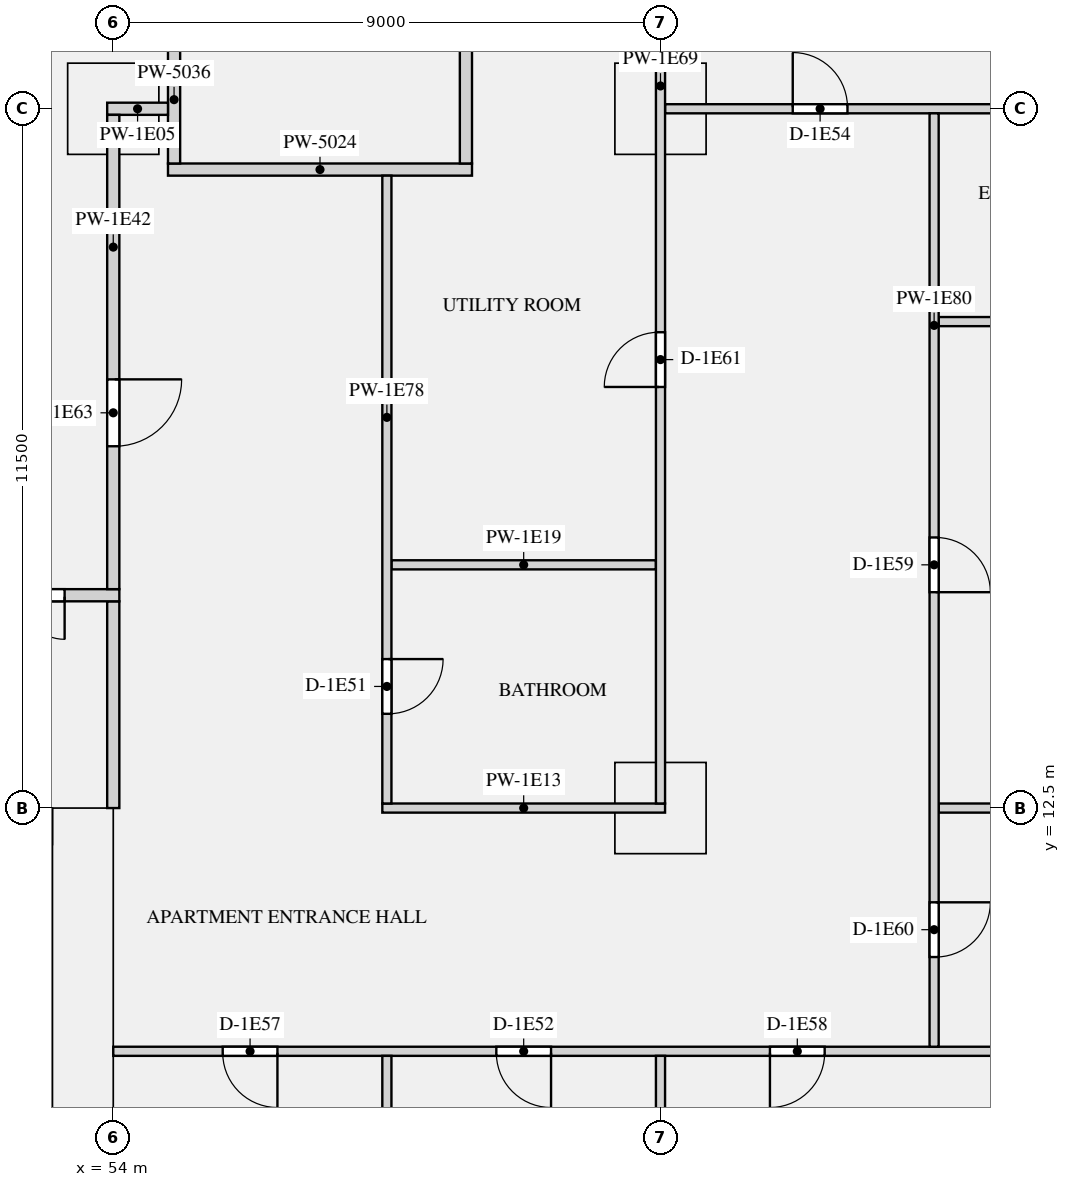
"""IFC4 building model, lengths in metres.
Left out: names, types, materials, properties, quantities, classifications, styles, units other than length and angle.
Written with IfcOpenShell. Run it as: python <this file> out.ifc"""

import sys

from ifc_helpers import new_model, si_unit, direction, frame, frame_2d, origin, origin_2d, place, context, subcontext, project, spatial, rectangle, extrude, element, fill, save


model = new_model("IFC4")
c1 = context("Model", 3, precision=1e-05, world=origin(), true_north=direction((0.0, 1.0)))
c2 = subcontext(c1, "Body", "Model", "MODEL_VIEW")
j1 = project(units=[si_unit("LENGTHUNIT", "METRE"), si_unit("PLANEANGLEUNIT", "RADIAN")], contexts=[c1])
p1 = place(None, origin())
s1 = spatial("IfcSite", under=j1, at=p1, CompositionType="ELEMENT")
p2 = place(p1, origin())
s2 = spatial("IfcBuilding", under=s1, at=p2, CompositionType="ELEMENT")
p3 = place(p2, frame((0.0, 0.0, 54.15)))
s3 = spatial("IfcBuildingStorey", under=s2, at=p3, CompositionType="ELEMENT", Elevation=54.15)
for number, where, z_axis, x_axis in (
    (1, (54.0, 24.0, 0.0), (0.0, 0.0, 1.0), (1.0, 0.0, 0.0)),
    (2, (63.0, 24.0, 0.0), (0.0, 0.0, 1.0), (1.0, 0.0, 0.0)),
    (3, (63.0, 12.5, 0.0), (0.0, 0.0, 1.0), (1.0, 0.0, 0.0)),
):
    element("IfcColumn", number, at=place(p3, frame(where, z_axis=z_axis, x_axis=x_axis)), inside=s3, PredefinedType="COLUMN", context=c2, shape_type="SweptSolid", body=[
        extrude(rectangle(XDim=1.5, YDim=1.5, at=origin_2d()), origin(), (0.0, 0.0, 1.0), 3.15),
    ])
p4 = place(p3, frame((53.5, 0.0, 0.0), z_axis=(0.0, 0.0, 1.0), x_axis=(0.0, 1.0, 0.0)))
e4 = element("IfcWall", 4, at=p4, inside=s3, PredefinedType="SHEAR", context=c2, shape_type="SweptSolid", body=[
    extrude(rectangle(XDim=12.5, YDim=1.0, at=frame_2d((6.25, 0.0))), origin(), (0.0, 0.0, 1.0), 3.15),
])
p5 = place(p3, frame((54.9, 23.0, 0.0), z_axis=(0.0, 0.0, 1.0), x_axis=(1.0, 0.0, 0.0)))
e5 = element("IfcWall", 5, at=p5, inside=s3, PredefinedType="PARTITIONING", context=c2, shape_type="SweptSolid", body=[
    extrude(rectangle(XDim=5.0, YDim=0.2, at=frame_2d((2.5, 0.0))), origin(), (0.0, 0.0, 1.0), 2.83),
])
p6 = place(p3, frame((54.0, 12.5, 0.0), z_axis=(0.0, 0.0, 1.0), x_axis=(0.0, 1.0, 0.0)))
e6 = element("IfcWall", 6, at=p6, inside=s3, PredefinedType="PARTITIONING", context=c2, shape_type="SweptSolid", body=[
    extrude(rectangle(XDim=3.4, YDim=0.2, at=frame_2d((1.7, 0.0))), origin(), (0.0, 0.0, 1.0), 2.83),
])
p7 = place(p3, frame((55.0, 23.1, 0.0), z_axis=(0.0, 0.0, 1.0), x_axis=(0.0, 1.0, 0.0)))
e7 = element("IfcWall", 7, at=p7, inside=s3, PredefinedType="PARTITIONING", context=c2, shape_type="SweptSolid", body=[
    extrude(rectangle(XDim=3.8, YDim=0.2, at=frame_2d((1.9, 0.0))), origin(), (0.0, 0.0, 1.0), 2.83),
])
p8 = place(p7, frame((2.1, 0.0, 0.0)))
e8 = element("IfcOpeningElement", 8, at=p8, cuts=e7, PredefinedType="OPENING", context=c2, shape_type="SweptSolid", body=[
    extrude(rectangle(XDim=1.2, YDim=2.1, at=frame_2d((0.6, 1.05))), frame((0.0, 0.11, 0.0), z_axis=(0.0, -1.0, 0.0), x_axis=(1.0, 0.0, 0.0)), (0.0, 0.0, 1.0), 0.22),
])
p9 = place(p3, frame((59.8, 23.1, 0.0), z_axis=(0.0, 0.0, 1.0), x_axis=(0.0, 1.0, 0.0)))
e9 = element("IfcWall", 9, at=p9, inside=s3, PredefinedType="PARTITIONING", context=c2, shape_type="SweptSolid", body=[
    extrude(rectangle(XDim=3.9, YDim=0.2, at=frame_2d((1.95, 0.0))), origin(), (0.0, 0.0, 1.0), 2.83),
])
p10 = place(p3, frame((63.075, 24.0, 0.0), z_axis=(0.0, 0.0, 1.0), x_axis=(1.0, 0.0, 0.0)))
e10 = element("IfcWall", 10, at=p10, inside=s3, PredefinedType="PARTITIONING", context=c2, shape_type="SweptSolid", body=[
    extrude(rectangle(XDim=10.125, YDim=0.15, at=frame_2d((5.062, 0.0))), origin(), (0.0, 0.0, 1.0), 2.83),
])
p11 = place(p10, frame((2.1, 0.0, 0.0)))
e11 = element("IfcOpeningElement", 11, at=p11, cuts=e10, PredefinedType="OPENING", context=c2, shape_type="SweptSolid", body=[
    extrude(rectangle(XDim=0.9, YDim=2.1, at=frame_2d((0.45, 1.05))), frame((0.0, 0.085, 0.0), z_axis=(0.0, -1.0, 0.0), x_axis=(1.0, 0.0, 0.0)), (0.0, 0.0, 1.0), 0.17),
])
p12 = place(p3, frame((53.9, 24.0, 0.0), z_axis=(0.0, 0.0, 1.0), x_axis=(1.0, 0.0, 0.0)))
e12 = element("IfcWall", 12, at=p12, inside=s3, PredefinedType="PARTITIONING", context=c2, shape_type="SweptSolid", body=[
    extrude(rectangle(XDim=1.0, YDim=0.2, at=frame_2d((0.5, 0.0))), origin(), (0.0, 0.0, 1.0), 2.83),
])
p13 = place(p3, frame((58.425, 12.5, 0.0), z_axis=(0.0, 0.0, 1.0), x_axis=(1.0, 0.0, 0.0)))
e13 = element("IfcWall", 13, at=p13, inside=s3, PredefinedType="PARTITIONING", context=c2, shape_type="SweptSolid", body=[
    extrude(rectangle(XDim=4.65, YDim=0.15, at=frame_2d((2.325, 0.0))), origin(), (0.0, 0.0, 1.0), 2.83),
])
p14 = place(p3, frame((67.575, 12.5, 0.0), z_axis=(0.0, 0.0, 1.0), x_axis=(1.0, 0.0, 0.0)))
e14 = element("IfcWall", 14, at=p14, inside=s3, PredefinedType="PARTITIONING", context=c2, shape_type="SweptSolid", body=[
    extrude(rectangle(XDim=8.125, YDim=0.15, at=frame_2d((4.062, 0.0))), origin(), (0.0, 0.0, 1.0), 2.83),
])
p15 = place(p3, frame((67.575, 20.5, 0.0), z_axis=(0.0, 0.0, 1.0), x_axis=(1.0, 0.0, 0.0)))
e15 = element("IfcWall", 15, at=p15, inside=s3, PredefinedType="PARTITIONING", context=c2, shape_type="SweptSolid", body=[
    extrude(rectangle(XDim=5.625, YDim=0.15, at=frame_2d((2.812, 0.0))), origin(), (0.0, 0.0, 1.0), 2.83),
])
p16 = place(p15, frame((1.775, 0.0, 0.0)))
e16 = element("IfcOpeningElement", 16, at=p16, cuts=e15, PredefinedType="OPENING", context=c2, shape_type="SweptSolid", body=[
    extrude(rectangle(XDim=0.8, YDim=2.1, at=frame_2d((0.4, 1.05))), frame((0.0, 0.085, 0.0), z_axis=(0.0, -1.0, 0.0), x_axis=(1.0, 0.0, 0.0)), (0.0, 0.0, 1.0), 0.17),
])
p17 = place(p3, frame((58.575, 16.5, 0.0), z_axis=(0.0, 0.0, 1.0), x_axis=(1.0, 0.0, 0.0)))
e17 = element("IfcWall", 17, at=p17, inside=s3, PredefinedType="PARTITIONING", context=c2, shape_type="SweptSolid", body=[
    extrude(rectangle(XDim=4.35, YDim=0.15, at=frame_2d((2.175, 0.0))), origin(), (0.0, 0.0, 1.0), 2.83),
])
p18 = place(p3, frame((54.0, 8.5, 0.0), z_axis=(0.0, 0.0, 1.0), x_axis=(1.0, 0.0, 0.0)))
e18 = element("IfcWall", 18, at=p18, inside=s3, PredefinedType="PARTITIONING", context=c2, shape_type="SweptSolid", body=[
    extrude(rectangle(XDim=21.7, YDim=0.15, at=frame_2d((10.85, 0.0))), origin(), (0.0, 0.0, 1.0), 2.83),
])
p19 = place(p18, frame((6.3, 0.0, 0.0)))
e19 = element("IfcOpeningElement", 19, at=p19, cuts=e18, PredefinedType="OPENING", context=c2, shape_type="SweptSolid", body=[
    extrude(rectangle(XDim=0.9, YDim=2.1, at=frame_2d((0.45, 1.05))), frame((0.0, 0.085, 0.0), z_axis=(0.0, -1.0, 0.0), x_axis=(1.0, 0.0, 0.0)), (0.0, 0.0, 1.0), 0.17),
])
p20 = place(p18, frame((1.8, 0.0, 0.0)))
e20 = element("IfcOpeningElement", 20, at=p20, cuts=e18, PredefinedType="OPENING", context=c2, shape_type="SweptSolid", body=[
    extrude(rectangle(XDim=0.9, YDim=2.1, at=frame_2d((0.45, 1.05))), frame((0.0, 0.085, 0.0), z_axis=(0.0, -1.0, 0.0), x_axis=(1.0, 0.0, 0.0)), (0.0, 0.0, 1.0), 0.17),
])
p21 = place(p18, frame((10.8, 0.0, 0.0)))
e21 = element("IfcOpeningElement", 21, at=p21, cuts=e18, PredefinedType="OPENING", context=c2, shape_type="SweptSolid", body=[
    extrude(rectangle(XDim=0.9, YDim=2.1, at=frame_2d((0.45, 1.05))), frame((0.0, 0.085, 0.0), z_axis=(0.0, -1.0, 0.0), x_axis=(1.0, 0.0, 0.0)), (0.0, 0.0, 1.0), 0.17),
])
p22 = place(p18, frame((19.175, 0.0, 0.0)))
e22 = element("IfcOpeningElement", 22, at=p22, cuts=e18, PredefinedType="OPENING", context=c2, shape_type="SweptSolid", body=[
    extrude(rectangle(XDim=1.5, YDim=2.1, at=frame_2d((0.75, 1.05))), frame((0.0, 0.085, 0.0), z_axis=(0.0, -1.0, 0.0), x_axis=(1.0, 0.0, 0.0)), (0.0, 0.0, 1.0), 0.17),
])
p23 = place(p3, frame((17.9, 16.0, 0.0), z_axis=(0.0, 0.0, 1.0), x_axis=(1.0, 0.0, 0.0)))
e23 = element("IfcWall", 23, at=p23, inside=s3, PredefinedType="PARTITIONING", context=c2, shape_type="SweptSolid", body=[
    extrude(rectangle(XDim=36.2, YDim=0.2, at=frame_2d((18.1, 0.0))), origin(), (0.0, 0.0, 1.0), 2.83),
])
p24 = place(p23, frame((0.9, 0.0, 0.0)))
e24 = element("IfcOpeningElement", 24, at=p24, cuts=e23, PredefinedType="OPENING", context=c2, shape_type="SweptSolid", body=[
    extrude(rectangle(XDim=1.4, YDim=2.1, at=frame_2d((0.7, 1.05))), frame((0.0, 0.11, 0.0), z_axis=(0.0, -1.0, 0.0), x_axis=(1.0, 0.0, 0.0)), (0.0, 0.0, 1.0), 0.22),
])
p25 = place(p23, frame((33.9, 0.0, 0.0)))
e25 = element("IfcOpeningElement", 25, at=p25, cuts=e23, PredefinedType="OPENING", context=c2, shape_type="SweptSolid", body=[
    extrude(rectangle(XDim=1.4, YDim=2.1, at=frame_2d((0.7, 1.05))), frame((0.0, 0.11, 0.0), z_axis=(0.0, -1.0, 0.0), x_axis=(1.0, 0.0, 0.0)), (0.0, 0.0, 1.0), 0.22),
])
p26 = place(p3, frame((54.0, 16.1, 0.0), z_axis=(0.0, 0.0, 1.0), x_axis=(0.0, 1.0, 0.0)))
e26 = element("IfcWall", 26, at=p26, inside=s3, PredefinedType="PARTITIONING", context=c2, shape_type="SweptSolid", body=[
    extrude(rectangle(XDim=7.8, YDim=0.2, at=frame_2d((3.9, 0.0))), origin(), (0.0, 0.0, 1.0), 2.83),
])
p27 = place(p26, frame((2.35, 0.0, 0.0)))
e27 = element("IfcOpeningElement", 27, at=p27, cuts=e26, PredefinedType="OPENING", context=c2, shape_type="SweptSolid", body=[
    extrude(rectangle(XDim=1.1, YDim=2.1, at=frame_2d((0.55, 1.05))), frame((0.0, 0.11, 0.0), z_axis=(0.0, -1.0, 0.0), x_axis=(1.0, 0.0, 0.0)), (0.0, 0.0, 1.0), 0.22),
])
p28 = place(p3, frame((63.0, 0.8, 0.0), z_axis=(0.0, 0.0, 1.0), x_axis=(0.0, 1.0, 0.0)))
e28 = element("IfcWall", 28, at=p28, inside=s3, PredefinedType="PARTITIONING", context=c2, shape_type="SweptSolid", body=[
    extrude(rectangle(XDim=7.625, YDim=0.15, at=frame_2d((3.812, 0.0))), origin(), (0.0, 0.0, 1.0), 2.83),
])
p29 = place(p3, frame((63.0, 12.575, 0.0), z_axis=(0.0, 0.0, 1.0), x_axis=(0.0, 1.0, 0.0)))
e29 = element("IfcWall", 29, at=p29, inside=s3, PredefinedType="PARTITIONING", context=c2, shape_type="SweptSolid", body=[
    extrude(rectangle(XDim=15.85, YDim=0.15, at=frame_2d((7.925, 0.0))), origin(), (0.0, 0.0, 1.0), 2.83),
])
p30 = place(p29, frame((6.85, 0.0, 0.0)))
e30 = element("IfcOpeningElement", 30, at=p30, cuts=e29, PredefinedType="OPENING", context=c2, shape_type="SweptSolid", body=[
    extrude(rectangle(XDim=0.9, YDim=2.1, at=frame_2d((0.45, 1.05))), frame((0.0, 0.085, 0.0), z_axis=(0.0, -1.0, 0.0), x_axis=(1.0, 0.0, 0.0)), (0.0, 0.0, 1.0), 0.17),
])
p31 = place(p3, frame((58.5, 0.8, 0.0), z_axis=(0.0, 0.0, 1.0), x_axis=(0.0, 1.0, 0.0)))
e31 = element("IfcWall", 31, at=p31, inside=s3, PredefinedType="PARTITIONING", context=c2, shape_type="SweptSolid", body=[
    extrude(rectangle(XDim=7.625, YDim=0.15, at=frame_2d((3.812, 0.0))), origin(), (0.0, 0.0, 1.0), 2.83),
])
p32 = place(p3, frame((58.5, 12.575, 0.0), z_axis=(0.0, 0.0, 1.0), x_axis=(0.0, 1.0, 0.0)))
e32 = element("IfcWall", 32, at=p32, inside=s3, PredefinedType="PARTITIONING", context=c2, shape_type="SweptSolid", body=[
    extrude(rectangle(XDim=10.325, YDim=0.15, at=frame_2d((5.163, 0.0))), origin(), (0.0, 0.0, 1.0), 2.83),
])
p33 = place(p32, frame((1.475, 0.0, 0.0)))
e33 = element("IfcOpeningElement", 33, at=p33, cuts=e32, PredefinedType="OPENING", context=c2, shape_type="SweptSolid", body=[
    extrude(rectangle(XDim=0.9, YDim=2.1, at=frame_2d((0.45, 1.05))), frame((0.0, 0.085, 0.0), z_axis=(0.0, -1.0, 0.0), x_axis=(1.0, 0.0, 0.0)), (0.0, 0.0, 1.0), 0.17),
])
p34 = place(p3, frame((67.5, 8.575, 0.0), z_axis=(0.0, 0.0, 1.0), x_axis=(0.0, 1.0, 0.0)))
e34 = element("IfcWall", 34, at=p34, inside=s3, PredefinedType="PARTITIONING", context=c2, shape_type="SweptSolid", body=[
    extrude(rectangle(XDim=15.35, YDim=0.15, at=frame_2d((7.675, 0.0))), origin(), (0.0, 0.0, 1.0), 2.83),
])
p35 = place(p34, frame((7.475, 0.0, 0.0)))
e35 = element("IfcOpeningElement", 35, at=p35, cuts=e34, PredefinedType="OPENING", context=c2, shape_type="SweptSolid", body=[
    extrude(rectangle(XDim=0.9, YDim=2.1, at=frame_2d((0.45, 1.05))), frame((0.0, 0.085, 0.0), z_axis=(0.0, -1.0, 0.0), x_axis=(1.0, 0.0, 0.0)), (0.0, 0.0, 1.0), 0.17),
])
p36 = place(p34, frame((1.475, 0.0, 0.0)))
e36 = element("IfcOpeningElement", 36, at=p36, cuts=e34, PredefinedType="OPENING", context=c2, shape_type="SweptSolid", body=[
    extrude(rectangle(XDim=0.9, YDim=2.1, at=frame_2d((0.45, 1.05))), frame((0.0, 0.085, 0.0), z_axis=(0.0, -1.0, 0.0), x_axis=(1.0, 0.0, 0.0)), (0.0, 0.0, 1.0), 0.17),
])
p37 = place(p25, frame((1.4, 0.0, 0.0), z_axis=(0.0, 0.0, 1.0), x_axis=(-1.0, 0.0, 0.0)))
e37 = element("IfcDoor", 37, at=p37, inside=s3, OperationType="DOUBLE_DOOR_SINGLE_SWING", PredefinedType="DOOR", context=c2, shape_type="SweptSolid", body=[
    extrude(rectangle(XDim=1.4, YDim=2.1, at=frame_2d((0.7, 1.05))), frame((0.0, 0.025, 0.0), z_axis=(0.0, -1.0, 0.0), x_axis=(1.0, 0.0, 0.0)), (0.0, 0.0, 1.0), 0.05),
])
fill(e25, e37)
p38 = place(p33, frame((0.9, 0.0, 0.0), z_axis=(0.0, 0.0, 1.0), x_axis=(-1.0, 0.0, 0.0)))
e38 = element("IfcDoor", 38, at=p38, inside=s3, OperationType="SINGLE_SWING_LEFT", PredefinedType="DOOR", context=c2, shape_type="SweptSolid", body=[
    extrude(rectangle(XDim=0.9, YDim=2.1, at=frame_2d((0.45, 1.05))), frame((0.0, 0.025, 0.0), z_axis=(0.0, -1.0, 0.0), x_axis=(1.0, 0.0, 0.0)), (0.0, 0.0, 1.0), 0.05),
])
fill(e33, e38)
p39 = place(p19, frame((0.9, 0.0, 0.0), z_axis=(0.0, 0.0, 1.0), x_axis=(-1.0, 0.0, 0.0)))
e39 = element("IfcDoor", 39, at=p39, inside=s3, OperationType="SINGLE_SWING_LEFT", PredefinedType="DOOR", context=c2, shape_type="SweptSolid", body=[
    extrude(rectangle(XDim=0.9, YDim=2.1, at=frame_2d((0.45, 1.05))), frame((0.0, 0.025, 0.0), z_axis=(0.0, -1.0, 0.0), x_axis=(1.0, 0.0, 0.0)), (0.0, 0.0, 1.0), 0.05),
])
fill(e19, e39)
p40 = place(p11, origin())
e40 = element("IfcDoor", 40, at=p40, inside=s3, OperationType="SINGLE_SWING_LEFT", PredefinedType="DOOR", context=c2, shape_type="SweptSolid", body=[
    extrude(rectangle(XDim=0.9, YDim=2.1, at=frame_2d((0.45, 1.05))), frame((0.0, 0.025, 0.0), z_axis=(0.0, -1.0, 0.0), x_axis=(1.0, 0.0, 0.0)), (0.0, 0.0, 1.0), 0.05),
])
fill(e11, e40)
p41 = place(p20, frame((0.9, 0.0, 0.0), z_axis=(0.0, 0.0, 1.0), x_axis=(-1.0, 0.0, 0.0)))
e41 = element("IfcDoor", 41, at=p41, inside=s3, OperationType="SINGLE_SWING_LEFT", PredefinedType="DOOR", context=c2, shape_type="SweptSolid", body=[
    extrude(rectangle(XDim=0.9, YDim=2.1, at=frame_2d((0.45, 1.05))), frame((0.0, 0.025, 0.0), z_axis=(0.0, -1.0, 0.0), x_axis=(1.0, 0.0, 0.0)), (0.0, 0.0, 1.0), 0.05),
])
fill(e20, e41)
p42 = place(p21, frame((0.9, 0.0, 0.0), z_axis=(0.0, 0.0, 1.0), x_axis=(-1.0, 0.0, 0.0)))
e42 = element("IfcDoor", 42, at=p42, inside=s3, OperationType="SINGLE_SWING_RIGHT", PredefinedType="DOOR", context=c2, shape_type="SweptSolid", body=[
    extrude(rectangle(XDim=0.9, YDim=2.1, at=frame_2d((0.45, 1.05))), frame((0.0, 0.025, 0.0), z_axis=(0.0, -1.0, 0.0), x_axis=(1.0, 0.0, 0.0)), (0.0, 0.0, 1.0), 0.05),
])
fill(e21, e42)
p43 = place(p35, frame((0.9, 0.0, 0.0), z_axis=(0.0, 0.0, 1.0), x_axis=(-1.0, 0.0, 0.0)))
e43 = element("IfcDoor", 43, at=p43, inside=s3, OperationType="SINGLE_SWING_RIGHT", PredefinedType="DOOR", context=c2, shape_type="SweptSolid", body=[
    extrude(rectangle(XDim=0.9, YDim=2.1, at=frame_2d((0.45, 1.05))), frame((0.0, 0.025, 0.0), z_axis=(0.0, -1.0, 0.0), x_axis=(1.0, 0.0, 0.0)), (0.0, 0.0, 1.0), 0.05),
])
fill(e35, e43)
p44 = place(p36, frame((0.9, 0.0, 0.0), z_axis=(0.0, 0.0, 1.0), x_axis=(-1.0, 0.0, 0.0)))
e44 = element("IfcDoor", 44, at=p44, inside=s3, OperationType="SINGLE_SWING_LEFT", PredefinedType="DOOR", context=c2, shape_type="SweptSolid", body=[
    extrude(rectangle(XDim=0.9, YDim=2.1, at=frame_2d((0.45, 1.05))), frame((0.0, 0.025, 0.0), z_axis=(0.0, -1.0, 0.0), x_axis=(1.0, 0.0, 0.0)), (0.0, 0.0, 1.0), 0.05),
])
fill(e36, e44)
p45 = place(p30, origin())
e45 = element("IfcDoor", 45, at=p45, inside=s3, OperationType="SINGLE_SWING_LEFT", PredefinedType="DOOR", context=c2, shape_type="SweptSolid", body=[
    extrude(rectangle(XDim=0.9, YDim=2.1, at=frame_2d((0.45, 1.05))), frame((0.0, 0.025, 0.0), z_axis=(0.0, -1.0, 0.0), x_axis=(1.0, 0.0, 0.0)), (0.0, 0.0, 1.0), 0.05),
])
fill(e30, e45)
p46 = place(p27, frame((1.1, 0.0, 0.0), z_axis=(0.0, 0.0, 1.0), x_axis=(-1.0, 0.0, 0.0)))
e46 = element("IfcDoor", 46, at=p46, inside=s3, OperationType="SINGLE_SWING_LEFT", PredefinedType="DOOR", context=c2, shape_type="SweptSolid", body=[
    extrude(rectangle(XDim=1.1, YDim=2.1, at=frame_2d((0.55, 1.05))), frame((0.0, 0.025, 0.0), z_axis=(0.0, -1.0, 0.0), x_axis=(1.0, 0.0, 0.0)), (0.0, 0.0, 1.0), 0.05),
])
fill(e27, e46)
save(model, sys.argv[1])
